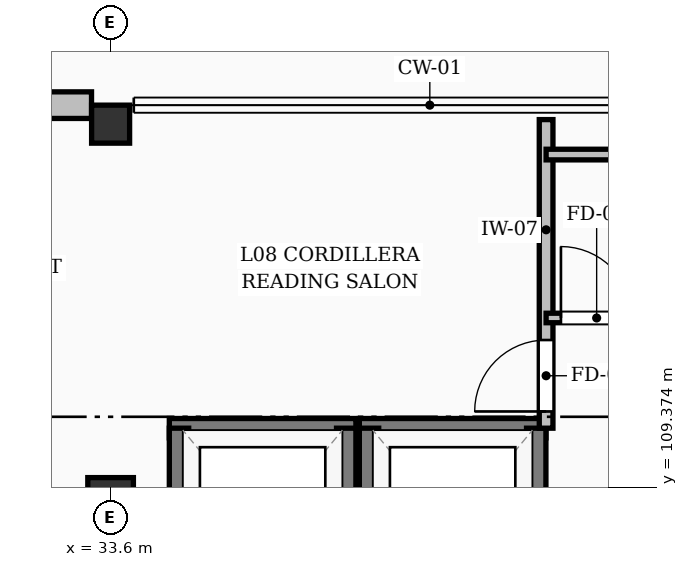
"""IFC4 building model, lengths in metres.
Left out: names, types, materials, properties, quantities, classifications, styles, units other than length and angle.
Written with IfcOpenShell. Run it as: python <this file> out.ifc"""

import sys

from ifc_helpers import new_model, si_unit, direction, frame, frame_2d, origin, origin_2d, place, context, subcontext, project, spatial, rectangle, extrude, element, fill, save


model = new_model("IFC4")
c1 = context("Model", 3, precision=1e-05, world=origin(), true_north=direction((0.0, 1.0)))
c2 = subcontext(c1, "Body", "Model", "MODEL_VIEW")
j1 = project(units=[si_unit("LENGTHUNIT", "METRE"), si_unit("PLANEANGLEUNIT", "RADIAN")], contexts=[c1])
p1 = place(None, origin())
s1 = spatial("IfcSite", under=j1, at=p1, CompositionType="ELEMENT")
p2 = place(p1, origin())
s2 = spatial("IfcBuilding", under=s1, at=p2, CompositionType="ELEMENT")
p3 = place(p2, frame((0.0, 0.0, 28.56)))
s3 = spatial("IfcBuildingStorey", under=s2, at=p3, CompositionType="ELEMENT", Elevation=28.56)
p4 = place(p3, frame((33.6, 109.2, 0.0), z_axis=(0.0, 0.0, 1.0), x_axis=(1.0, 0.0, 0.0)))
e1 = element("IfcColumn", 1, at=p4, inside=s3, PredefinedType="COLUMN", context=c2, shape_type="SweptSolid", body=[
    extrude(rectangle(XDim=0.6, YDim=0.6, at=origin_2d()), origin(), (0.0, 0.0, 1.0), 3.36),
])
p5 = place(p3, frame((33.6, 114.15, -0.315), z_axis=(0.0, 0.0, 1.0), x_axis=(1.0, 0.0, 0.0)))
e2 = element("IfcColumn", 2, at=p5, inside=s3, PredefinedType="COLUMN", context=c2, shape_type="SweptSolid", body=[
    extrude(rectangle(XDim=0.5, YDim=0.5, at=origin_2d()), origin(), (0.0, 0.0, 1.0), 3.675),
])
p6 = place(p3, frame((25.451, 114.4, 0.0), z_axis=(0.0, 0.0, 1.0), x_axis=(1.0, 0.0, 0.0)))
e3 = element("IfcWall", 3, at=p6, inside=s3, PredefinedType="SOLIDWALL", context=c2, shape_type="SweptSolid", body=[
    extrude(rectangle(XDim=7.898, YDim=0.35, at=frame_2d((3.949, 0.0))), origin(), (0.0, 0.0, 1.0), 2.494),
])
p7 = place(p6, frame((1.024, 0.0, 0.0)))
e4 = element("IfcOpeningElement", 4, at=p7, cuts=e3, PredefinedType="OPENING", context=c2, shape_type="SweptSolid", body=[
    extrude(rectangle(XDim=1.65, YDim=2.08, at=frame_2d((0.825, 1.04))), frame((0.0, 0.185, 0.0), z_axis=(0.0, -1.0, 0.0), x_axis=(1.0, 0.0, 0.0)), (0.0, 0.0, 1.0), 0.37),
])
p8 = place(p6, frame((4.909, 0.0, 0.25)))
e5 = element("IfcOpeningElement", 5, at=p8, cuts=e3, PredefinedType="OPENING", context=c2, shape_type="SweptSolid", body=[
    extrude(rectangle(XDim=2.28, YDim=2.0, at=frame_2d((1.14, 1.0))), frame((0.0, 0.185, 0.0), z_axis=(0.0, -1.0, 0.0), x_axis=(1.0, 0.0, 0.0)), (0.0, 0.0, 1.0), 0.37),
])
p9 = place(p3, frame((34.373, 110.15, 0.0), z_axis=(0.0, 0.0, 1.0), x_axis=(1.0, 0.0, 0.0)))
e6 = element("IfcWall", 6, at=p9, inside=s3, PredefinedType="SOLIDWALL", context=c2, shape_type="SweptSolid", body=[
    extrude(rectangle(XDim=2.455, YDim=0.255, at=frame_2d((1.228, 0.0))), origin(), (0.0, 0.0, 1.0), 3.12),
])
for number, where, z_axis, x_axis in (
    (7, (34.5, 107.55, 0.0), (0.0, 0.0, 1.0), (0.0, 1.0, 0.0)),
    (8, (36.7, 107.55, 0.0), (0.0, 0.0, 1.0), (0.0, 1.0, 0.0)),
):
    element("IfcWall", number, at=place(p3, frame(where, z_axis=z_axis, x_axis=x_axis)), inside=s3, PredefinedType="SOLIDWALL", context=c2, shape_type="SweptSolid", body=[
        extrude(rectangle(XDim=2.6, YDim=0.255, at=frame_2d((1.3, 0.0))), origin(), (0.0, 0.0, 1.0), 3.12),
    ])
p10 = place(p3, frame((36.873, 110.15, 0.0), z_axis=(0.0, 0.0, 1.0), x_axis=(1.0, 0.0, 0.0)))
e9 = element("IfcWall", 9, at=p10, inside=s3, PredefinedType="SOLIDWALL", context=c2, shape_type="SweptSolid", body=[
    extrude(rectangle(XDim=2.455, YDim=0.255, at=frame_2d((1.228, 0.0))), origin(), (0.0, 0.0, 1.0), 3.12),
])
for number, where, z_axis, x_axis in (
    (10, (37.0, 107.55, 0.0), (0.0, 0.0, 1.0), (0.0, 1.0, 0.0)),
    (11, (39.2, 107.55, 0.0), (0.0, 0.0, 1.0), (0.0, 1.0, 0.0)),
):
    element("IfcWall", number, at=place(p3, frame(where, z_axis=z_axis, x_axis=x_axis)), inside=s3, PredefinedType="SOLIDWALL", context=c2, shape_type="SweptSolid", body=[
        extrude(rectangle(XDim=2.6, YDim=0.255, at=frame_2d((1.3, 0.0))), origin(), (0.0, 0.0, 1.0), 3.12),
    ])
p11 = place(p3, frame((39.33, 110.15, 0.0), z_axis=(0.0, 0.0, 1.0), x_axis=(0.0, 1.0, 0.0)))
e12 = element("IfcWall", 12, at=p11, inside=s3, PredefinedType="PARTITIONING", context=c2, shape_type="SweptSolid", body=[
    extrude(rectangle(XDim=4.06, YDim=0.18, at=frame_2d((2.03, 0.0))), origin(), (0.0, 0.0, 1.0), 3.12),
])
p12 = place(p11, frame((0.22, 0.0, 0.0)))
e13 = element("IfcOpeningElement", 13, at=p12, cuts=e12, PredefinedType="OPENING", context=c2, shape_type="SweptSolid", body=[
    extrude(rectangle(XDim=0.94, YDim=2.1, at=frame_2d((0.47, 1.05))), frame((0.0, 0.1, 0.0), z_axis=(0.0, -1.0, 0.0), x_axis=(1.0, 0.0, 0.0)), (0.0, 0.0, 1.0), 0.2),
])
p13 = place(p3, frame((39.33, 111.6, 0.0), z_axis=(0.0, 0.0, 1.0), x_axis=(1.0, 0.0, 0.0)))
e14 = element("IfcWall", 14, at=p13, inside=s3, PredefinedType="PARTITIONING", context=c2, shape_type="SweptSolid", body=[
    extrude(rectangle(XDim=1.33, YDim=0.125, at=frame_2d((0.665, 0.0))), origin(), (0.0, 0.0, 1.0), 3.12),
])
p14 = place(p13, frame((0.195, 0.0, 0.0)))
e15 = element("IfcOpeningElement", 15, at=p14, cuts=e14, PredefinedType="OPENING", context=c2, shape_type="SweptSolid", body=[
    extrude(rectangle(XDim=0.94, YDim=2.1, at=frame_2d((0.47, 1.05))), frame((0.0, 0.073, 0.0), z_axis=(0.0, -1.0, 0.0), x_axis=(1.0, 0.0, 0.0)), (0.0, 0.0, 1.0), 0.145),
])
p15 = place(p3, frame((39.33, 113.75, 0.0), z_axis=(0.0, 0.0, 1.0), x_axis=(1.0, 0.0, 0.0)))
e16 = element("IfcWall", 16, at=p15, inside=s3, PredefinedType="PARTITIONING", context=c2, shape_type="SweptSolid", body=[
    extrude(rectangle(XDim=2.67, YDim=0.14, at=frame_2d((1.335, 0.0))), origin(), (0.0, 0.0, 1.0), 3.12),
])
p16 = place(p12, origin())
e17 = element("IfcDoor", 17, at=p16, inside=s3, OperationType="SINGLE_SWING_LEFT", PredefinedType="DOOR", context=c2, shape_type="SweptSolid", body=[
    extrude(rectangle(XDim=0.94, YDim=2.1, at=frame_2d((0.47, 1.05))), frame((0.0, 0.025, 0.0), z_axis=(0.0, -1.0, 0.0), x_axis=(1.0, 0.0, 0.0)), (0.0, 0.0, 1.0), 0.05),
])
fill(e13, e17)
p17 = place(p14, origin())
e18 = element("IfcDoor", 18, at=p17, inside=s3, OperationType="SINGLE_SWING_LEFT", PredefinedType="DOOR", context=c2, shape_type="SweptSolid", body=[
    extrude(rectangle(XDim=0.94, YDim=2.1, at=frame_2d((0.47, 1.05))), frame((0.0, 0.025, 0.0), z_axis=(0.0, -1.0, 0.0), x_axis=(1.0, 0.0, 0.0)), (0.0, 0.0, 1.0), 0.05),
])
fill(e15, e18)
save(model, sys.argv[1])
